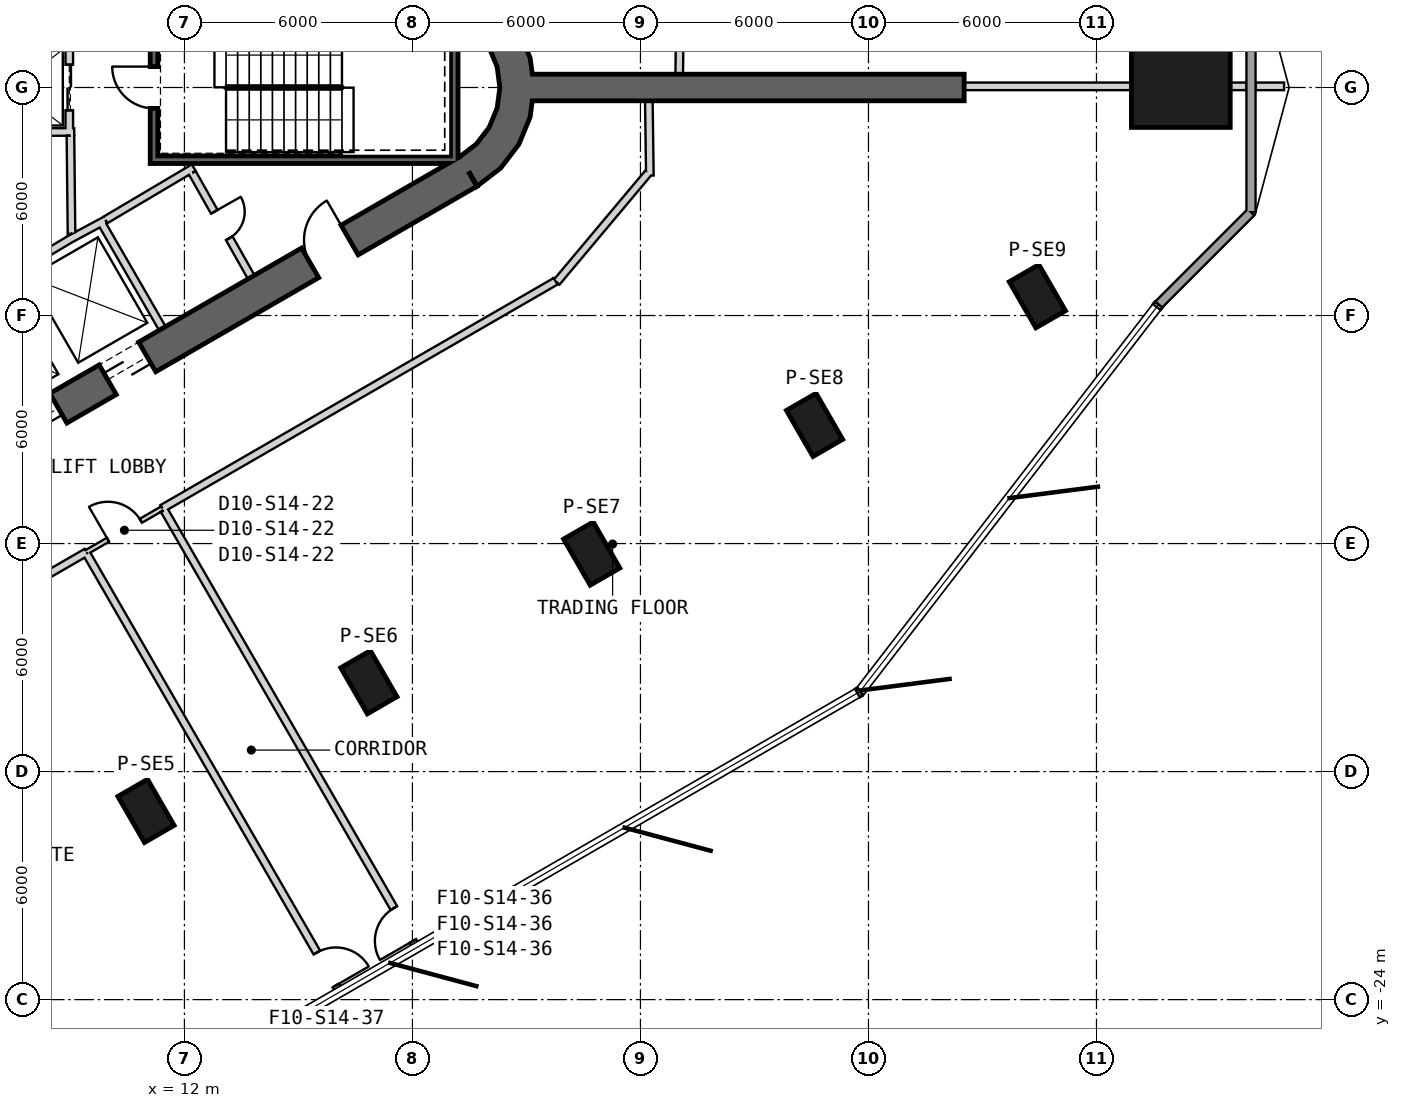
"""IFC4 building model, lengths in metres.
Left out: names, types, materials, properties, quantities, classifications, styles, units other than length and angle.
Written with IfcOpenShell. Run it as: python <this file> out.ifc"""

import sys

from ifc_helpers import new_model, si_unit, direction, frame, frame_2d, origin, origin_2d, place, context, subcontext, project, spatial, polyline, rectangle, outline, extrude, element, fill, save


model = new_model("IFC4")
c1 = context("Model", 3, precision=1e-05, world=origin(), true_north=direction((0.0, 1.0)))
c2 = subcontext(c1, "Body", "Model", "MODEL_VIEW")
j1 = project(units=[si_unit("LENGTHUNIT", "METRE"), si_unit("PLANEANGLEUNIT", "RADIAN")], contexts=[c1])
p1 = place(None, origin())
s1 = spatial("IfcSite", under=j1, at=p1, CompositionType="ELEMENT")
p2 = place(p1, origin())
s2 = spatial("IfcBuilding", under=s1, at=p2, CompositionType="ELEMENT")
p3 = place(p2, frame((0.0, 0.0, 229.2)))
s3 = spatial("IfcBuildingStorey", under=s2, at=p3, CompositionType="ELEMENT", Elevation=229.2)
p4 = place(p3, frame((38.219, 0.0, 0.0), z_axis=(0.0, 0.0, 1.0), x_axis=(1.0, 0.0, 0.0)))
e1 = element("IfcColumn", 1, at=p4, inside=s3, PredefinedType="COLUMN", context=c2, shape_type="SweptSolid", body=[
    extrude(rectangle(XDim=2.6, YDim=2.1, at=origin_2d()), origin(), (0.0, 0.0, 1.0), 4.0),
])
for number, where, z_axis, x_axis in (
    (2, (10.99, -19.035, 0.0), (0.0, 0.0, 1.0), (0.5, -0.866, 0.0)),
    (3, (16.854, -15.649, 0.0), (0.0, 0.0, 1.0), (0.5, -0.866, 0.0)),
    (4, (22.717, -12.264, 0.0), (0.0, 0.0, 1.0), (0.5, -0.866, 0.0)),
    (5, (28.581, -8.878, 0.0), (0.0, 0.0, 1.0), (0.5, -0.866, 0.0)),
    (6, (34.445, -5.493, 0.0), (0.0, 0.0, 1.0), (0.5, -0.866, 0.0)),
):
    element("IfcColumn", number, at=place(p3, frame(where, z_axis=z_axis, x_axis=x_axis)), inside=s3, PredefinedType="COLUMN", context=c2, shape_type="SweptSolid", body=[
        extrude(rectangle(XDim=1.4, YDim=0.9, at=origin_2d()), origin(), (0.0, 0.0, 1.0), 4.0),
    ])
p5 = place(p3, frame((-7.825, -17.97, 0.0), z_axis=(0.0, 0.0, 1.0), x_axis=(0.866028369851, 0.499994862586, 0.0)))
e7 = element("IfcWall", 7, at=p5, inside=s3, PredefinedType="SHEAR", context=c2, shape_type="SweptSolid", body=[
    extrude(rectangle(XDim=31.523, YDim=0.9, at=frame_2d((15.762, 0.0))), origin(), (0.0, 0.0, 1.0), 4.0),
])
p6 = place(p5, frame((7.062, 0.0, 0.0)))
e8 = element("IfcOpeningElement", 8, at=p6, cuts=e7, PredefinedType="OPENING", context=c2, shape_type="SweptSolid", body=[
    extrude(rectangle(XDim=1.2, YDim=2.4, at=frame_2d((0.6, 1.2))), frame((0.0, 0.46, 0.0), z_axis=(0.0, -1.0, 0.0), x_axis=(1.0, 0.0, 0.0)), (0.0, 0.0, 1.0), 0.92),
])
p7 = place(p5, frame((9.762, 0.0, 0.0)))
e9 = element("IfcOpeningElement", 9, at=p7, cuts=e7, PredefinedType="OPENING", context=c2, shape_type="SweptSolid", body=[
    extrude(rectangle(XDim=1.2, YDim=2.4, at=frame_2d((0.6, 1.2))), frame((0.0, 0.46, 0.0), z_axis=(0.0, -1.0, 0.0), x_axis=(1.0, 0.0, 0.0)), (0.0, 0.0, 1.0), 0.92),
])
p8 = place(p5, frame((12.462, 0.0, 0.0)))
e10 = element("IfcOpeningElement", 10, at=p8, cuts=e7, PredefinedType="OPENING", context=c2, shape_type="SweptSolid", body=[
    extrude(rectangle(XDim=1.2, YDim=2.4, at=frame_2d((0.6, 1.2))), frame((0.0, 0.46, 0.0), z_axis=(0.0, -1.0, 0.0), x_axis=(1.0, 0.0, 0.0)), (0.0, 0.0, 1.0), 0.92),
])
p9 = place(p5, frame((15.162, 0.0, 0.0)))
e11 = element("IfcOpeningElement", 11, at=p9, cuts=e7, PredefinedType="OPENING", context=c2, shape_type="SweptSolid", body=[
    extrude(rectangle(XDim=1.2, YDim=2.4, at=frame_2d((0.6, 1.2))), frame((0.0, 0.46, 0.0), z_axis=(0.0, -1.0, 0.0), x_axis=(1.0, 0.0, 0.0)), (0.0, 0.0, 1.0), 0.92),
])
p10 = place(p5, frame((17.862, 0.0, 0.0)))
e12 = element("IfcOpeningElement", 12, at=p10, cuts=e7, PredefinedType="OPENING", context=c2, shape_type="SweptSolid", body=[
    extrude(rectangle(XDim=1.2, YDim=2.4, at=frame_2d((0.6, 1.2))), frame((0.0, 0.46, 0.0), z_axis=(0.0, -1.0, 0.0), x_axis=(1.0, 0.0, 0.0)), (0.0, 0.0, 1.0), 0.92),
])
p11 = place(p5, frame((20.562, 0.0, 0.0)))
e13 = element("IfcOpeningElement", 13, at=p11, cuts=e7, PredefinedType="OPENING", context=c2, shape_type="SweptSolid", body=[
    extrude(rectangle(XDim=1.2, YDim=2.4, at=frame_2d((0.6, 1.2))), frame((0.0, 0.46, 0.0), z_axis=(0.0, -1.0, 0.0), x_axis=(1.0, 0.0, 0.0)), (0.0, 0.0, 1.0), 0.92),
])
p12 = place(p5, frame((26.712, 0.0, 0.0)))
e14 = element("IfcOpeningElement", 14, at=p12, cuts=e7, PredefinedType="OPENING", context=c2, shape_type="SweptSolid", body=[
    extrude(rectangle(XDim=1.2, YDim=2.4, at=frame_2d((0.6, 1.2))), frame((0.0, 0.46, 0.0), z_axis=(0.0, -1.0, 0.0), x_axis=(1.0, 0.0, 0.0)), (0.0, 0.0, 1.0), 0.92),
])
p13 = place(p5, frame((3.612, 0.0, 0.0)))
e15 = element("IfcOpeningElement", 15, at=p13, cuts=e7, PredefinedType="OPENING", context=c2, shape_type="SweptSolid", body=[
    extrude(rectangle(XDim=1.2, YDim=2.4, at=frame_2d((0.6, 1.2))), frame((0.0, 0.46, 0.0), z_axis=(0.0, -1.0, 0.0), x_axis=(1.0, 0.0, 0.0)), (0.0, 0.0, 1.0), 0.92),
])
p14 = place(p3, origin())
e16 = element("IfcWall", 16, at=p14, inside=s3, PredefinedType="SHEAR", context=c2, shape_type="SweptSolid", body=[
    extrude(outline(polyline([(19.7, -2.598), (20.321, -2.121), (20.798, -1.5), (21.098, -0.777), (21.2, 0.0), (21.098, 0.777), (20.798, 1.5), (20.321, 2.121), (19.7, 2.598), (19.25, 1.819), (19.685, 1.485), (20.019, 1.05), (20.229, 0.543), (20.3, 0.0), (20.229, -0.543), (20.019, -1.05), (19.685, -1.485), (19.25, -1.819), (19.7, -2.598)])), origin(), (0.0, 0.0, 1.0), 4.0),
])
p15 = place(p3, frame((21.15, 0.0, 0.0), z_axis=(0.0, 0.0, 1.0), x_axis=(1.0, 0.0, 0.0)))
e17 = element("IfcWall", 17, at=p15, inside=s3, PredefinedType="SHEAR", context=c2, shape_type="SweptSolid", body=[
    extrude(rectangle(XDim=11.368, YDim=0.7, at=frame_2d((5.684, 0.0))), origin(), (0.0, 0.0, 1.0), 4.0),
])
p16 = place(p3, frame((37.635, -5.713, 0.0), z_axis=(0.0, 0.0, 1.0), x_axis=(0.707106781187, 0.707106781187, 0.0)))
e18 = element("IfcWall", 18, at=p16, inside=s3, PredefinedType="SOLIDWALL", context=c2, shape_type="SweptSolid", body=[
    extrude(rectangle(XDim=3.438, YDim=0.24, at=frame_2d((1.719, 0.0))), origin(), (0.0, 0.0, 1.0), 3.7),
])
p17 = place(p3, frame((40.066, -3.282, 0.0), z_axis=(0.0, 0.0, 1.0), x_axis=(0.0, 1.0, 0.0)))
e19 = element("IfcWall", 19, at=p17, inside=s3, PredefinedType="SOLIDWALL", context=c2, shape_type="SweptSolid", body=[
    extrude(rectangle(XDim=6.564, YDim=0.24, at=frame_2d((3.282, 0.0))), origin(), (0.0, 0.0, 1.0), 3.7),
])
p18 = place(p3, frame((9.795, -3.525, 0.0), z_axis=(0.0, 0.0, 1.0), x_axis=(0.499984717929, -0.866034226713, 0.0)))
e20 = element("IfcWall", 20, at=p18, inside=s3, PredefinedType="PLUMBINGWALL", context=c2, shape_type="SweptSolid", body=[
    extrude(rectangle(XDim=3.25, YDim=0.2, at=frame_2d((1.625, 0.0))), origin(), (0.0, 0.0, 1.0), 3.7),
])
p19 = place(p3, frame((8.974, -3.999, 0.0), z_axis=(0.0, 0.0, 1.0), x_axis=(0.880907015104, 0.473289373154, 0.0)))
e21 = element("IfcWall", 21, at=p19, inside=s3, PredefinedType="PLUMBINGWALL", context=c2, shape_type="SweptSolid", body=[
    extrude(rectangle(XDim=1.078, YDim=0.2, at=frame_2d((0.539, 0.0))), origin(), (0.0, 0.0, 1.0), 3.7),
])
p20 = place(p3, frame((7.497, -4.886, 0.0), z_axis=(0.0, 0.0, 1.0), x_axis=(0.857516281273, 0.51445682749, 0.0)))
e22 = element("IfcWall", 22, at=p20, inside=s3, PredefinedType="PLUMBINGWALL", context=c2, shape_type="SweptSolid", body=[
    extrude(rectangle(XDim=1.845, YDim=0.2, at=frame_2d((0.922, 0.0))), origin(), (0.0, 0.0, 1.0), 3.7),
])
p21 = place(p3, frame((19.1, -2.0, -0.3), z_axis=(0.0, 0.0, 1.0), x_axis=(0.0, 1.0, 0.0)))
e23 = element("IfcWall", 23, at=p21, inside=s3, PredefinedType="SHEAR", context=c2, shape_type="SweptSolid", body=[
    extrude(rectangle(XDim=3.8, YDim=0.2, at=frame_2d((1.9, 0.0))), origin(), (0.0, 0.0, 1.0), 4.0),
])
p22 = place(p3, frame((11.1, -1.9, -0.3), z_axis=(0.0, 0.0, 1.0), x_axis=(1.0, 0.0, 0.0)))
e24 = element("IfcWall", 24, at=p22, inside=s3, PredefinedType="SHEAR", context=c2, shape_type="SweptSolid", body=[
    extrude(rectangle(XDim=7.9, YDim=0.2, at=frame_2d((3.95, 0.0))), origin(), (0.0, 0.0, 1.0), 4.0),
])
p23 = place(p3, frame((11.2, -1.8, -0.3), z_axis=(0.0, 0.0, 1.0), x_axis=(0.0, 1.0, 0.0)))
e25 = element("IfcWall", 25, at=p23, inside=s3, PredefinedType="SHEAR", context=c2, shape_type="SweptSolid", body=[
    extrude(rectangle(XDim=3.6, YDim=0.2, at=frame_2d((1.8, 0.0))), origin(), (0.0, 0.0, 1.0), 4.0),
])
p24 = place(p23, frame((1.25, 0.0, 0.3)))
e26 = element("IfcOpeningElement", 26, at=p24, cuts=e25, PredefinedType="OPENING", context=c2, shape_type="SweptSolid", body=[
    extrude(rectangle(XDim=1.1, YDim=2.1, at=frame_2d((0.55, 1.05))), frame((0.0, 0.11, 0.0), z_axis=(0.0, -1.0, 0.0), x_axis=(1.0, 0.0, 0.0)), (0.0, 0.0, 1.0), 0.22),
])
p25 = place(p3, frame((8.97, 1.2, 0.0), z_axis=(0.0, 0.0, 1.0), x_axis=(0.0, -1.0, 0.0)))
e27 = element("IfcWall", 27, at=p25, inside=s3, PredefinedType="PLUMBINGWALL", context=c2, shape_type="SweptSolid", body=[
    extrude(rectangle(XDim=2.4, YDim=0.2, at=frame_2d((1.2, 0.0))), origin(), (0.0, 0.0, 1.0), 3.7),
])
p26 = place(p25, frame((0.6, 0.0, 0.0)))
e28 = element("IfcOpeningElement", 28, at=p26, cuts=e27, PredefinedType="OPENING", context=c2, shape_type="SweptSolid", body=[
    extrude(rectangle(XDim=1.2, YDim=2.4, at=frame_2d((0.6, 1.2))), frame((0.0, 0.11, 0.0), z_axis=(0.0, -1.0, 0.0), x_axis=(1.0, 0.0, 0.0)), (0.0, 0.0, 1.0), 0.22),
])
p27 = place(p3, frame((9.1, -1.17, 0.0), z_axis=(0.0, 0.0, 1.0), x_axis=(-0.999998759609, -0.001575049235, 0.0)))
e29 = element("IfcWall", 29, at=p27, inside=s3, PredefinedType="PLUMBINGWALL", context=c2, shape_type="SweptSolid", body=[
    extrude(rectangle(XDim=3.1, YDim=0.2, at=frame_2d((1.55, 0.0))), origin(), (0.0, 0.0, 1.0), 3.7),
])
p28 = place(p3, frame((12.245, -2.109, 0.0), z_axis=(0.0, 0.0, 1.0), x_axis=(-0.860414880418, -0.509594185166, 0.0)))
e30 = element("IfcWall", 30, at=p28, inside=s3, PredefinedType="PARTITIONING", context=c2, shape_type="SweptSolid", body=[
    extrude(rectangle(XDim=2.7, YDim=0.2, at=frame_2d((1.35, 0.0))), origin(), (0.0, 0.0, 1.0), 3.7),
])
p29 = place(p3, frame((13.758, -4.99, 0.0), z_axis=(0.0, 0.0, 1.0), x_axis=(-0.491993409184, 0.87059892334, 0.0)))
e31 = element("IfcWall", 31, at=p29, inside=s3, PredefinedType="PARTITIONING", context=c2, shape_type="SweptSolid", body=[
    extrude(rectangle(XDim=3.15, YDim=0.2, at=frame_2d((1.575, 0.0))), origin(), (0.0, 0.0, 1.0), 3.7),
])
p30 = place(p29, frame((1.175, 0.0, 0.0)))
e32 = element("IfcOpeningElement", 32, at=p30, cuts=e31, PredefinedType="OPENING", context=c2, shape_type="SweptSolid", body=[
    extrude(rectangle(XDim=0.8, YDim=2.1, at=frame_2d((0.4, 1.05))), frame((0.0, 0.11, 0.0), z_axis=(0.0, -1.0, 0.0), x_axis=(1.0, 0.0, 0.0)), (0.0, 0.0, 1.0), 0.22),
])
p31 = place(p3, frame((9.029, -3.851, 0.0), z_axis=(0.0, 0.0, 1.0), x_axis=(-0.010784614026, 0.999941844359, 0.0)))
e33 = element("IfcWall", 33, at=p31, inside=s3, PredefinedType="PARTITIONING", context=c2, shape_type="SweptSolid", body=[
    extrude(rectangle(XDim=2.581, YDim=0.2, at=frame_2d((1.291, 0.0))), origin(), (0.0, 0.0, 1.0), 3.7),
])
p32 = place(p3, frame((25.021, 0.35, 0.0), z_axis=(0.0, 0.0, 1.0), x_axis=(0.012014998271, 0.999927817303, 0.0)))
e34 = element("IfcWall", 34, at=p32, inside=s3, PredefinedType="PARTITIONING", context=c2, shape_type="SweptSolid", body=[
    extrude(rectangle(XDim=2.093, YDim=0.2, at=frame_2d((1.046, 0.0))), origin(), (0.0, 0.0, 1.0), 3.7),
])
p33 = place(p3, frame((9.425, -12.225, 0.0), z_axis=(0.0, 0.0, 1.0), x_axis=(0.866053019151, 0.499952165731, 0.0)))
e35 = element("IfcWall", 35, at=p33, inside=s3, PredefinedType="PARTITIONING", context=c2, shape_type="SweptSolid", body=[
    extrude(rectangle(XDim=2.3, YDim=0.12, at=frame_2d((1.15, 0.0))), origin(), (0.0, 0.0, 1.0), 3.7),
])
p34 = place(p33, frame((0.65, 0.0, 0.0)))
e36 = element("IfcOpeningElement", 36, at=p34, cuts=e35, PredefinedType="OPENING", context=c2, shape_type="SweptSolid", body=[
    extrude(rectangle(XDim=1.0, YDim=2.1, at=frame_2d((0.5, 1.05))), frame((0.0, 0.07, 0.0), z_axis=(0.0, -1.0, 0.0), x_axis=(1.0, 0.0, 0.0)), (0.0, 0.0, 1.0), 0.14),
])
p35 = place(p3, frame((24.248, -2.317, 0.0), z_axis=(0.0, 0.0, 1.0), x_axis=(-0.013654841032, 0.999906768312, 0.0)))
e37 = element("IfcWall", 37, at=p35, inside=s3, PredefinedType="PARTITIONING", context=c2, shape_type="SweptSolid", body=[
    extrude(rectangle(XDim=1.967, YDim=0.2, at=frame_2d((0.983, 0.0))), origin(), (0.0, 0.0, 1.0), 3.7),
])
p36 = place(p3, frame((21.793, -5.124, 0.0), z_axis=(0.0, 0.0, 1.0), x_axis=(0.642787733653, 0.766044339098, 0.0)))
e38 = element("IfcWall", 38, at=p36, inside=s3, PredefinedType="PARTITIONING", context=c2, shape_type="SweptSolid", body=[
    extrude(rectangle(XDim=3.767, YDim=0.2, at=frame_2d((1.884, 0.0))), origin(), (0.0, 0.0, 1.0), 2.78),
])
p37 = place(p3, frame((-6.644, -21.503, 0.0), z_axis=(0.0, 0.0, 1.0), x_axis=(0.866020815794, 0.500007946548, 0.0)))
e39 = element("IfcWall", 39, at=p37, inside=s3, PredefinedType="PARTITIONING", context=c2, shape_type="SweptSolid", body=[
    extrude(rectangle(XDim=18.555, YDim=0.2, at=frame_2d((9.278, 0.0))), origin(), (0.0, 0.0, 1.0), 2.88),
])
p38 = place(p37, frame((2.477, 0.0, 0.0)))
e40 = element("IfcOpeningElement", 40, at=p38, cuts=e39, PredefinedType="OPENING", context=c2, shape_type="SweptSolid", body=[
    extrude(rectangle(XDim=1.0, YDim=2.1, at=frame_2d((0.5, 1.05))), frame((0.0, 0.11, 0.0), z_axis=(0.0, -1.0, 0.0), x_axis=(1.0, 0.0, 0.0)), (0.0, 0.0, 1.0), 0.22),
])
p39 = place(p3, frame((11.417, -11.075, 0.0), z_axis=(0.0, 0.0, 1.0), x_axis=(0.866027793211, 0.49999586137, 0.0)))
e41 = element("IfcWall", 41, at=p39, inside=s3, PredefinedType="PARTITIONING", context=c2, shape_type="SweptSolid", body=[
    extrude(rectangle(XDim=11.955, YDim=0.2, at=frame_2d((5.978, 0.0))), origin(), (0.0, 0.0, 1.0), 2.88),
])
p40 = place(p3, frame((40.937, 0.03, 0.0), z_axis=(0.0, 0.0, 1.0), x_axis=(-1.0, 0.0, 0.0)))
e42 = element("IfcWall", 42, at=p40, inside=s3, PredefinedType="PARTITIONING", context=c2, shape_type="SweptSolid", body=[
    extrude(rectangle(XDim=0.751, YDim=0.2, at=frame_2d((0.376, 0.0))), origin(), (0.0, 0.0, 1.0), 3.7),
])
p41 = place(p3, frame((39.946, 0.03, 0.0), z_axis=(0.0, 0.0, 1.0), x_axis=(-1.0, 0.0, 0.0)))
e43 = element("IfcWall", 43, at=p41, inside=s3, PredefinedType="PARTITIONING", context=c2, shape_type="SweptSolid", body=[
    extrude(rectangle(XDim=0.426, YDim=0.2, at=frame_2d((0.213, 0.0))), origin(), (0.0, 0.0, 1.0), 3.7),
])
p42 = place(p3, frame((36.92, 0.03, 0.0), z_axis=(0.0, 0.0, 1.0), x_axis=(-1.0, 0.0, 0.0)))
e44 = element("IfcWall", 44, at=p42, inside=s3, PredefinedType="PARTITIONING", context=c2, shape_type="SweptSolid", body=[
    extrude(rectangle(XDim=4.402, YDim=0.2, at=frame_2d((2.201, 0.0))), origin(), (0.0, 0.0, 1.0), 3.27),
])
p43 = place(p3, frame((18.112, -22.631, 0.0), z_axis=(0.0, 0.0, 1.0), x_axis=(-0.499988448798, 0.866032072771, 0.0)))
e45 = element("IfcWall", 45, at=p43, inside=s3, PredefinedType="PARTITIONING", context=c2, shape_type="SweptSolid", body=[
    extrude(rectangle(XDim=13.295, YDim=0.2, at=frame_2d((6.647, 0.0))), origin(), (0.0, 0.0, 1.0), 3.7),
])
p44 = place(p43, frame((0.2, 0.0, 0.0)))
e46 = element("IfcOpeningElement", 46, at=p44, cuts=e45, PredefinedType="OPENING", context=c2, shape_type="SweptSolid", body=[
    extrude(rectangle(XDim=1.0, YDim=2.1, at=frame_2d((0.5, 1.05))), frame((0.0, 0.11, 0.0), z_axis=(0.0, -1.0, 0.0), x_axis=(1.0, 0.0, 0.0)), (0.0, 0.0, 1.0), 0.22),
])
p45 = place(p3, frame((9.438, -12.287, 0.0), z_axis=(0.0, 0.0, 1.0), x_axis=(0.499994270035, -0.866028711956, 0.0)))
e47 = element("IfcWall", 47, at=p45, inside=s3, PredefinedType="PARTITIONING", context=c2, shape_type="SweptSolid", body=[
    extrude(rectangle(XDim=13.295, YDim=0.2, at=frame_2d((6.647, 0.0))), origin(), (0.0, 0.0, 1.0), 3.7),
])
p46 = place(p45, frame((12.095, 0.0, 0.0)))
e48 = element("IfcOpeningElement", 48, at=p46, cuts=e47, PredefinedType="OPENING", context=c2, shape_type="SweptSolid", body=[
    extrude(rectangle(XDim=1.0, YDim=2.1, at=frame_2d((0.5, 1.05))), frame((0.0, 0.11, 0.0), z_axis=(0.0, -1.0, 0.0), x_axis=(1.0, 0.0, 0.0)), (0.0, 0.0, 1.0), 0.22),
])
p47 = place(p24, origin())
e49 = element("IfcDoor", 49, at=p47, inside=s3, OperationType="SINGLE_SWING_RIGHT", PredefinedType="USERDEFINED", context=c2, shape_type="SweptSolid", body=[
    extrude(rectangle(XDim=1.1, YDim=2.1, at=frame_2d((0.55, 1.05))), frame((0.0, 0.025, 0.0), z_axis=(0.0, -1.0, 0.0), x_axis=(1.0, 0.0, 0.0)), (0.0, 0.0, 1.0), 0.05),
])
fill(e26, e49)
p48 = place(p26, origin())
e50 = element("IfcDoor", 50, at=p48, inside=s3, OperationType="SLIDING_TO_LEFT", PredefinedType="USERDEFINED", context=c2, shape_type="SweptSolid", body=[
    extrude(rectangle(XDim=1.2, YDim=2.4, at=frame_2d((0.6, 1.2))), frame((0.0, 0.025, 0.0), z_axis=(0.0, -1.0, 0.0), x_axis=(1.0, 0.0, 0.0)), (0.0, 0.0, 1.0), 0.05),
])
fill(e28, e50)
p49 = place(p30, origin())
e51 = element("IfcDoor", 51, at=p49, inside=s3, OperationType="SINGLE_SWING_LEFT", PredefinedType="USERDEFINED", context=c2, shape_type="SweptSolid", body=[
    extrude(rectangle(XDim=0.8, YDim=2.1, at=frame_2d((0.4, 1.05))), frame((0.0, 0.025, 0.0), z_axis=(0.0, -1.0, 0.0), x_axis=(1.0, 0.0, 0.0)), (0.0, 0.0, 1.0), 0.05),
])
fill(e32, e51)
p50 = place(p34, origin())
e52 = element("IfcDoor", 52, at=p50, inside=s3, OperationType="SINGLE_SWING_RIGHT", PredefinedType="NOTDEFINED", context=c2, shape_type="SweptSolid", body=[
    extrude(rectangle(XDim=1.0, YDim=2.1, at=frame_2d((0.5, 1.05))), frame((0.0, 0.025, 0.0), z_axis=(0.0, -1.0, 0.0), x_axis=(1.0, 0.0, 0.0)), (0.0, 0.0, 1.0), 0.05),
])
fill(e36, e52)
p51 = place(p44, origin())
e53 = element("IfcDoor", 53, at=p51, inside=s3, OperationType="SINGLE_SWING_LEFT", PredefinedType="USERDEFINED", context=c2, shape_type="SweptSolid", body=[
    extrude(rectangle(XDim=1.0, YDim=2.1, at=frame_2d((0.5, 1.05))), frame((0.0, 0.025, 0.0), z_axis=(0.0, -1.0, 0.0), x_axis=(1.0, 0.0, 0.0)), (0.0, 0.0, 1.0), 0.05),
])
fill(e46, e53)
p52 = place(p46, origin())
e54 = element("IfcDoor", 54, at=p52, inside=s3, OperationType="SINGLE_SWING_LEFT", PredefinedType="USERDEFINED", context=c2, shape_type="SweptSolid", body=[
    extrude(rectangle(XDim=1.0, YDim=2.1, at=frame_2d((0.5, 1.05))), frame((0.0, 0.025, 0.0), z_axis=(0.0, -1.0, 0.0), x_axis=(1.0, 0.0, 0.0)), (0.0, 0.0, 1.0), 0.05),
])
fill(e48, e54)
p53 = place(p10, origin())
e55 = element("IfcDoor", 55, at=p53, inside=s3, OperationType="SLIDING_TO_LEFT", PredefinedType="USERDEFINED", context=c2, shape_type="SweptSolid", body=[
    extrude(rectangle(XDim=1.2, YDim=2.4, at=frame_2d((0.6, 1.2))), frame((0.0, 0.025, 0.0), z_axis=(0.0, -1.0, 0.0), x_axis=(1.0, 0.0, 0.0)), (0.0, 0.0, 1.0), 0.05),
])
fill(e12, e55)
p54 = place(p11, origin())
e56 = element("IfcDoor", 56, at=p54, inside=s3, OperationType="SLIDING_TO_LEFT", PredefinedType="USERDEFINED", context=c2, shape_type="SweptSolid", body=[
    extrude(rectangle(XDim=1.2, YDim=2.4, at=frame_2d((0.6, 1.2))), frame((0.0, 0.025, 0.0), z_axis=(0.0, -1.0, 0.0), x_axis=(1.0, 0.0, 0.0)), (0.0, 0.0, 1.0), 0.05),
])
fill(e13, e56)
p55 = place(p12, origin())
e57 = element("IfcDoor", 57, at=p55, inside=s3, OperationType="SINGLE_SWING_RIGHT", PredefinedType="USERDEFINED", context=c2, shape_type="SweptSolid", body=[
    extrude(rectangle(XDim=1.2, YDim=2.4, at=frame_2d((0.6, 1.2))), frame((0.0, 0.025, 0.0), z_axis=(0.0, -1.0, 0.0), x_axis=(1.0, 0.0, 0.0)), (0.0, 0.0, 1.0), 0.05),
])
fill(e14, e57)
save(model, sys.argv[1])
